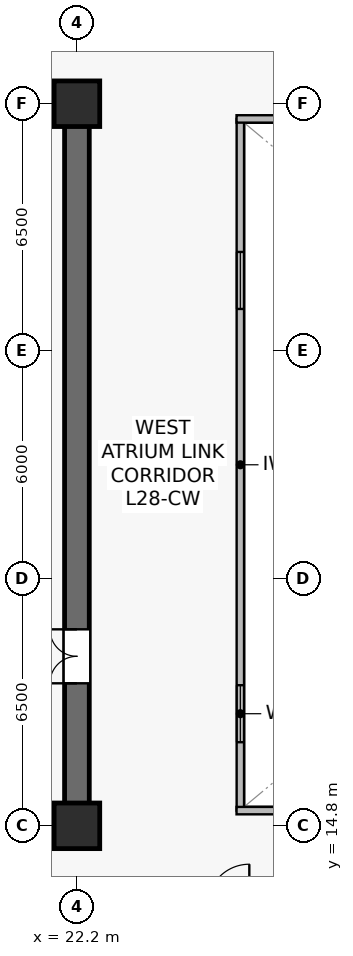
"""IFC4 building model, lengths in metres.
Left out: names, types, materials, properties, quantities, classifications, styles, units other than length and angle.
Written with IfcOpenShell. Run it as: python <this file> out.ifc"""

import sys

from ifc_helpers import new_model, si_unit, direction, frame, frame_2d, origin, origin_2d, place, context, subcontext, project, spatial, rectangle, extrude, source, transform, mapped, element, fill, save


model = new_model("IFC4")
c1 = context("Model", 3, precision=1e-05, world=origin(), true_north=direction((0.0, 1.0)))
c2 = subcontext(c1, "Body", "Model", "MODEL_VIEW")
j1 = project(units=[si_unit("LENGTHUNIT", "METRE"), si_unit("PLANEANGLEUNIT", "RADIAN")], contexts=[c1])
p1 = place(None, origin())
s1 = spatial("IfcSite", under=j1, at=p1, CompositionType="ELEMENT")
p2 = place(p1, origin())
s2 = spatial("IfcBuilding", under=s1, at=p2, CompositionType="ELEMENT")
p3 = place(p2, frame((0.0, 0.0, 117.4)))
s3 = spatial("IfcBuildingStorey", under=s2, at=p3, CompositionType="ELEMENT", Elevation=117.4)
p4 = place(p3, frame((7.075, 14.8, 0.0), z_axis=(0.0, 0.0, 1.0), x_axis=(1.0, 0.0, 0.0)))
e1 = element("IfcWall", 1, at=p4, inside=s3, PredefinedType="SHEAR", context=c2, shape_type="SweptSolid", body=[
    extrude(rectangle(XDim=15.45, YDim=0.65, at=frame_2d((7.725, 0.0))), origin(), (0.0, 0.0, 1.0), 3.79),
])
p5 = place(p3, frame((7.075, 33.8, 0.0), z_axis=(0.0, 0.0, 1.0), x_axis=(1.0, 0.0, 0.0)))
e2 = element("IfcWall", 2, at=p5, inside=s3, PredefinedType="SHEAR", context=c2, shape_type="SweptSolid", body=[
    extrude(rectangle(XDim=15.45, YDim=0.65, at=frame_2d((7.725, 0.0))), origin(), (0.0, 0.0, 1.0), 3.79),
])
p6 = place(p5, frame((5.675, 0.0, 0.0)))
e3 = element("IfcOpeningElement", 3, at=p6, cuts=e2, PredefinedType="OPENING", context=c2, shape_type="SweptSolid", body=[
    extrude(rectangle(XDim=0.95, YDim=2.15, at=frame_2d((0.475, 1.075))), frame((0.0, 0.335, 0.0), z_axis=(0.0, -1.0, 0.0), x_axis=(1.0, 0.0, 0.0)), (0.0, 0.0, 1.0), 0.67),
])
p7 = place(p5, frame((9.04, 0.0, 0.0)))
e4 = element("IfcOpeningElement", 4, at=p7, cuts=e2, PredefinedType="OPENING", context=c2, shape_type="SweptSolid", body=[
    extrude(rectangle(XDim=0.95, YDim=2.15, at=frame_2d((0.475, 1.075))), frame((0.0, 0.335, 0.0), z_axis=(0.0, -1.0, 0.0), x_axis=(1.0, 0.0, 0.0)), (0.0, 0.0, 1.0), 0.67),
])
p8 = place(p5, frame((12.44, 0.0, 0.0)))
e5 = element("IfcOpeningElement", 5, at=p8, cuts=e2, PredefinedType="OPENING", context=c2, shape_type="SweptSolid", body=[
    extrude(rectangle(XDim=0.95, YDim=2.15, at=frame_2d((0.475, 1.075))), frame((0.0, 0.335, 0.0), z_axis=(0.0, -1.0, 0.0), x_axis=(1.0, 0.0, 0.0)), (0.0, 0.0, 1.0), 0.67),
])
p9 = place(p3, frame((22.2, 15.125, 0.0), z_axis=(0.0, 0.0, 1.0), x_axis=(0.0, 1.0, 0.0)))
e6 = element("IfcWall", 6, at=p9, inside=s3, PredefinedType="SHEAR", context=c2, shape_type="SweptSolid", body=[
    extrude(rectangle(XDim=18.35, YDim=0.65, at=frame_2d((9.175, 0.0))), origin(), (0.0, 0.0, 1.0), 3.79),
])
p10 = place(p9, frame((3.425, 0.0, 0.0)))
e7 = element("IfcOpeningElement", 7, at=p10, cuts=e6, PredefinedType="OPENING", context=c2, shape_type="SweptSolid", body=[
    extrude(rectangle(XDim=1.42, YDim=2.2, at=frame_2d((0.71, 1.1))), frame((0.0, 0.335, 0.0), z_axis=(0.0, -1.0, 0.0), x_axis=(1.0, 0.0, 0.0)), (0.0, 0.0, 1.0), 0.67),
])
m1 = source(origin(), c2, "Body", "SweptSolid", [
    extrude(rectangle(XDim=1.2, YDim=1.2, at=origin_2d()), origin(), (0.0, 0.0, 1.0), 4.1),
])
for number, where, z_axis, x_axis in (
    (8, (22.2, 14.8, 0.0), (0.0, 0.0, 1.0), (1.0, 0.0, 0.0)),
    (9, (22.2, 33.8, 0.0), (0.0, 0.0, 1.0), (1.0, 0.0, 0.0)),
):
    element("IfcColumn", number, at=place(p3, frame(where, z_axis=z_axis, x_axis=x_axis)), inside=s3, PredefinedType="COLUMN", context=c2, shape_type="MappedRepresentation", body=[
        mapped(m1, transform((0.0, 0.0, 0.0), scale=1.0)),
    ])
p11 = place(p3, frame((26.5, 15.2, 0.0), z_axis=(0.0, 0.0, 1.0), x_axis=(0.0, 1.0, 0.0)))
e10 = element("IfcWall", 10, at=p11, inside=s3, PredefinedType="SOLIDWALL", context=c2, shape_type="SweptSolid", body=[
    extrude(rectangle(XDim=18.2, YDim=0.195, at=frame_2d((9.1, 0.0))), origin(), (0.0, 0.0, 1.0), 3.79),
])
p12 = place(p11, frame((1.8, 0.0, 0.9)))
e11 = element("IfcOpeningElement", 11, at=p12, cuts=e10, PredefinedType="OPENING", context=c2, shape_type="SweptSolid", body=[
    extrude(rectangle(XDim=1.5, YDim=1.4, at=frame_2d((0.75, 0.7))), frame((0.0, 0.107, 0.0), z_axis=(0.0, -1.0, 0.0), x_axis=(1.0, 0.0, 0.0)), (0.0, 0.0, 1.0), 0.215),
])
p13 = place(p11, frame((13.2, 0.0, 0.9)))
e12 = element("IfcOpeningElement", 12, at=p13, cuts=e10, PredefinedType="OPENING", context=c2, shape_type="SweptSolid", body=[
    extrude(rectangle(XDim=1.5, YDim=1.4, at=frame_2d((0.75, 0.7))), frame((0.0, 0.107, 0.0), z_axis=(0.0, -1.0, 0.0), x_axis=(1.0, 0.0, 0.0)), (0.0, 0.0, 1.0), 0.215),
])
for number, where, z_axis, x_axis in (
    (13, (26.4, 15.2, 0.0), (0.0, 0.0, 1.0), (1.0, 0.0, 0.0)),
    (14, (26.4, 33.4, 0.0), (0.0, 0.0, 1.0), (1.0, 0.0, 0.0)),
):
    element("IfcWall", number, at=place(p3, frame(where, z_axis=z_axis, x_axis=x_axis)), inside=s3, PredefinedType="SOLIDWALL", context=c2, shape_type="SweptSolid", body=[
        extrude(rectangle(XDim=22.0, YDim=0.195, at=frame_2d((11.0, 0.0))), origin(), (0.0, 0.0, 1.0), 3.79),
    ])
m2 = source(origin(), c2, "Body", "SweptSolid", [
    extrude(rectangle(XDim=1.5, YDim=1.4, at=frame_2d((0.75, 0.7))), frame((0.0, 0.03, 0.0), z_axis=(0.0, -1.0, 0.0), x_axis=(1.0, 0.0, 0.0)), (0.0, 0.0, 1.0), 0.06),
])
p14 = place(p12, origin())
e15 = element("IfcWindow", 15, at=p14, inside=s3, PartitioningType="SINGLE_PANEL", PredefinedType="WINDOW", context=c2, shape_type="MappedRepresentation", body=[
    mapped(m2, transform((0.0, 0.0, 0.0), scale=1.0)),
])
fill(e11, e15)
p15 = place(p13, origin())
e16 = element("IfcWindow", 16, at=p15, inside=s3, PartitioningType="SINGLE_PANEL", PredefinedType="WINDOW", context=c2, shape_type="MappedRepresentation", body=[
    mapped(m2, transform((0.0, 0.0, 0.0), scale=1.0)),
])
fill(e12, e16)
m3 = source(origin(), c2, "Body", "SweptSolid", [
    extrude(rectangle(XDim=1.42, YDim=2.2, at=frame_2d((0.71, 1.1))), frame((0.0, 0.025, 0.0), z_axis=(0.0, -1.0, 0.0), x_axis=(1.0, 0.0, 0.0)), (0.0, 0.0, 1.0), 0.05),
])
p16 = place(p10, origin())
e17 = element("IfcDoor", 17, at=p16, inside=s3, OperationType="DOUBLE_DOOR_SINGLE_SWING", PredefinedType="DOOR", context=c2, shape_type="MappedRepresentation", body=[
    mapped(m3, transform((0.0, 0.0, 0.0), scale=1.0)),
])
fill(e7, e17)
save(model, sys.argv[1])
